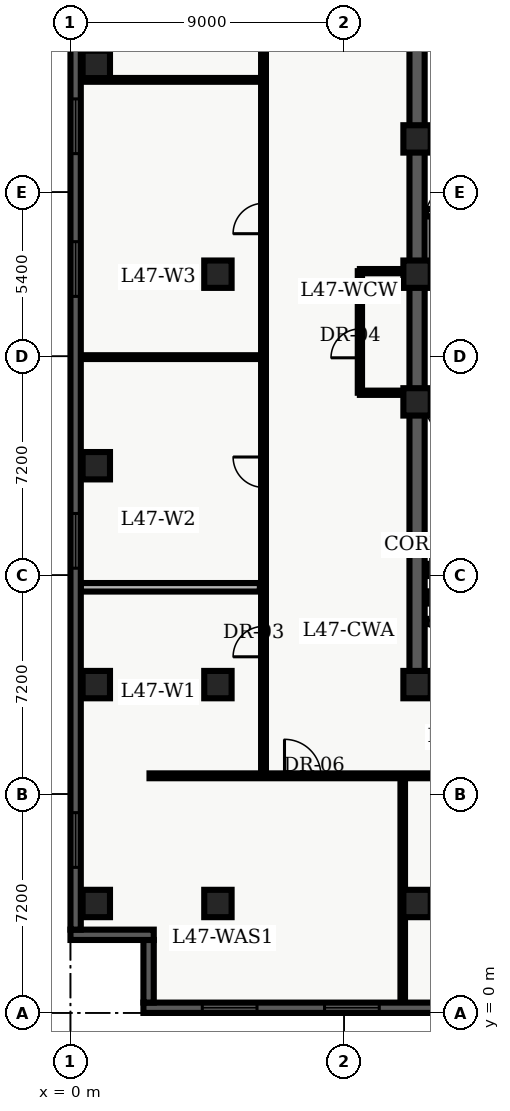
"""IFC4 building model, lengths in metres.
Left out: names, types, materials, properties, quantities, classifications, styles, units other than length and angle.
Written with IfcOpenShell. Run it as: python <this file> out.ifc"""

import sys

from ifc_helpers import new_model, entity, si_unit, converted_unit, direction, frame, origin_with_axes, origin_2d_with_axis, place, context, subcontext, project, spatial, polyline, rectangle, outline, extrude, element, fill, save


model = new_model("IFC4")
c1 = context("Model", 3, precision=1e-05, world=origin_with_axes(), true_north=direction((0.0, 1.0)))
c2 = subcontext(c1, "Body", "Model", "MODEL_VIEW")
j1 = project(units=[si_unit("LENGTHUNIT", "METRE"), converted_unit("PLANEANGLEUNIT", "DEGREE", entity("IfcPlaneAngleMeasure", 0.017), si_unit("PLANEANGLEUNIT", "RADIAN"), dimensions=[0, 0, 0, 0, 0, 0, 0])], contexts=[c1])
p1 = place(None, origin_with_axes())
s1 = spatial("IfcSite", under=j1, at=p1, CompositionType="ELEMENT")
p2 = place(p1, origin_with_axes())
s2 = spatial("IfcBuilding", under=s1, at=p2, CompositionType="ELEMENT")
p3 = place(p2, frame((0.0, 0.0, 192.6), z_axis=(0.0, 0.0, 1.0), x_axis=(1.0, 0.0, 0.0)))
s3 = spatial("IfcBuildingStorey", under=s2, at=p3, CompositionType="ELEMENT", Elevation=192.6)
p4 = place(p3, frame((11.4, 10.8, 0.0), z_axis=(0.0, 0.0, 1.0), x_axis=(0.0, 1.0, 0.0)))
e1 = element("IfcWall", 1, at=p4, inside=s3, PredefinedType="SHEAR", context=c2, shape_type="SweptSolid", body=[
    extrude(outline(polyline([(0.0, -0.25), (27.0, -0.25), (27.0, 0.25), (0.0, 0.25), (0.0, -0.25)])), origin_with_axes(), (0.0, 0.0, 1.0), 3.66),
])
p5 = place(p3, frame((11.4, 10.8, 0.0), z_axis=(0.0, 0.0, 1.0), x_axis=(1.0, 0.0, 0.0)))
e2 = element("IfcWall", 2, at=p5, inside=s3, PredefinedType="SHEAR", context=c2, shape_type="SweptSolid", body=[
    extrude(outline(polyline([(0.0, -0.25), (7.2, -0.25), (7.2, 0.25), (0.0, 0.25), (0.0, -0.25)])), origin_with_axes(), (0.0, 0.0, 1.0), 3.66),
])
p6 = place(p5, frame((2.625, 0.0, 0.0), z_axis=(0.0, 0.0, 1.0), x_axis=(1.0, 0.0, 0.0)))
e3 = element("IfcOpeningElement", 3, at=p6, cuts=e2, PredefinedType="OPENING", context=c2, shape_type="SweptSolid", body=[
    extrude(rectangle(XDim=1.05, YDim=0.52, at=origin_2d_with_axis()), origin_with_axes(), (0.0, 0.0, 1.0), 2.15),
])
for number, where, z_axis, x_axis in (
    (4, (11.65, 19.825, 0.0), (0.0, 0.0, 1.0), (1.0, 0.0, 0.0)),
    (5, (11.65, 28.775, 0.0), (0.0, 0.0, 1.0), (1.0, 0.0, 0.0)),
):
    element("IfcWall", number, at=place(p3, frame(where, z_axis=z_axis, x_axis=x_axis)), inside=s3, PredefinedType="SHEAR", context=c2, shape_type="SweptSolid", body=[
        extrude(outline(polyline([(0.0, -0.125), (6.7, -0.125), (6.7, 0.125), (0.0, 0.125), (0.0, -0.125)])), origin_with_axes(), (0.0, 0.0, 1.0), 3.66),
    ])
p7 = place(p3, frame((11.7, 24.1, 0.0), z_axis=(0.0, 0.0, 1.0), x_axis=(1.0, 0.0, 0.0)))
e6 = element("IfcWall", 6, at=p7, inside=s3, PredefinedType="SOLIDWALL", context=c2, shape_type="SweptSolid", body=[
    extrude(outline(polyline([(0.0, -0.125), (6.6, -0.125), (6.6, 0.125), (0.0, 0.125), (0.0, -0.125)])), origin_with_axes(), (0.0, 0.0, 1.0), 2.7),
])
p8 = place(p7, frame((3.75, 0.0, 0.0), z_axis=(0.0, 0.0, 1.0), x_axis=(1.0, 0.0, 0.0)))
e7 = element("IfcOpeningElement", 7, at=p8, cuts=e6, PredefinedType="OPENING", context=c2, shape_type="SweptSolid", body=[
    extrude(rectangle(XDim=0.9, YDim=0.27, at=origin_2d_with_axis()), origin_with_axes(), (0.0, 0.0, 1.0), 2.15),
])
p9 = place(p3, frame((11.7, 26.325, 0.0), z_axis=(0.0, 0.0, 1.0), x_axis=(1.0, 0.0, 0.0)))
e8 = element("IfcWall", 8, at=p9, inside=s3, PredefinedType="SOLIDWALL", context=c2, shape_type="SweptSolid", body=[
    extrude(outline(polyline([(0.0, -0.125), (6.6, -0.125), (6.6, 0.125), (0.0, 0.125), (0.0, -0.125)])), origin_with_axes(), (0.0, 0.0, 1.0), 2.7),
])
p10 = place(p9, frame((3.5, 0.0, 0.0), z_axis=(0.0, 0.0, 1.0), x_axis=(1.0, 0.0, 0.0)))
e9 = element("IfcOpeningElement", 9, at=p10, cuts=e8, PredefinedType="OPENING", context=c2, shape_type="SweptSolid", body=[
    extrude(rectangle(XDim=0.9, YDim=0.27, at=origin_2d_with_axis()), origin_with_axes(), (0.0, 0.0, 1.0), 2.15),
])
for number, where, z_axis, x_axis in (
    (10, (11.4, 3.6, 0.0), (0.0, 0.0, 1.0), (1.0, 0.0, 0.0)),
    (11, (11.4, 10.8, 0.0), (0.0, 0.0, 1.0), (1.0, 0.0, 0.0)),
    (12, (11.4, 20.1, 0.0), (0.0, 0.0, 1.0), (1.0, 0.0, 0.0)),
    (13, (11.4, 24.3, 0.0), (0.0, 0.0, 1.0), (1.0, 0.0, 0.0)),
    (14, (11.4, 28.75, 0.0), (0.0, 0.0, 1.0), (1.0, 0.0, 0.0)),
    (15, (4.85, 3.6, 0.0), (0.0, 0.0, 1.0), (1.0, 0.0, 0.0)),
    (16, (4.85, 10.8, 0.0), (0.0, 0.0, 1.0), (1.0, 0.0, 0.0)),
    (17, (4.85, 24.3, 0.0), (0.0, 0.0, 1.0), (1.0, 0.0, 0.0)),
    (18, (0.85, 3.6, 0.0), (0.0, 0.0, 1.0), (1.0, 0.0, 0.0)),
    (19, (0.85, 10.8, 0.0), (0.0, 0.0, 1.0), (1.0, 0.0, 0.0)),
    (20, (0.85, 18.0, 0.0), (0.0, 0.0, 1.0), (1.0, 0.0, 0.0)),
    (21, (0.85, 31.2, 0.0), (0.0, 0.0, 1.0), (1.0, 0.0, 0.0)),
):
    element("IfcColumn", number, at=place(p3, frame(where, z_axis=z_axis, x_axis=x_axis)), inside=s3, PredefinedType="COLUMN", context=c2, shape_type="SweptSolid", body=[
        extrude(rectangle(XDim=0.9, YDim=0.9, at=origin_2d_with_axis()), origin_with_axes(), (0.0, 0.0, 1.0), 3.9),
    ])
p11 = place(p3, frame((9.52, 20.4, 0.0), z_axis=(0.0, 0.0, 1.0), x_axis=(0.0, 1.0, 0.0)))
e22 = element("IfcWall", 22, at=p11, inside=s3, PredefinedType="PARTITIONING", context=c2, shape_type="SweptSolid", body=[
    extrude(outline(polyline([(0.0, -0.07), (4.0, -0.07), (4.0, 0.07), (0.0, 0.07), (0.0, -0.07)])), origin_with_axes(), (0.0, 0.0, 1.0), 2.7),
])
p12 = place(p11, frame((1.625, 0.0, 0.0), z_axis=(0.0, 0.0, 1.0), x_axis=(1.0, 0.0, 0.0)))
e23 = element("IfcOpeningElement", 23, at=p12, cuts=e22, PredefinedType="OPENING", context=c2, shape_type="SweptSolid", body=[
    extrude(rectangle(XDim=0.95, YDim=0.16, at=origin_2d_with_axis()), origin_with_axes(), (0.0, 0.0, 1.0), 2.15),
])
for number, where, z_axis, x_axis in (
    (24, (9.52, 20.4, 0.0), (0.0, 0.0, 1.0), (1.0, 0.0, 0.0)),
    (25, (9.52, 24.4, 0.0), (0.0, 0.0, 1.0), (1.0, 0.0, 0.0)),
):
    element("IfcWall", number, at=place(p3, frame(where, z_axis=z_axis, x_axis=x_axis)), inside=s3, PredefinedType="PARTITIONING", context=c2, shape_type="SweptSolid", body=[
        extrude(outline(polyline([(0.0, -0.07), (1.58, -0.07), (1.58, 0.07), (0.0, 0.07), (0.0, -0.07)])), origin_with_axes(), (0.0, 0.0, 1.0), 2.7),
    ])
p13 = place(p3, frame((2.6, 7.8, 0.0), z_axis=(0.0, 0.0, 1.0), x_axis=(1.0, 0.0, 0.0)))
e26 = element("IfcWall", 26, at=p13, inside=s3, PredefinedType="PARTITIONING", context=c2, shape_type="SweptSolid", body=[
    extrude(outline(polyline([(0.0, -0.08), (18.55, -0.08), (18.55, 0.08), (0.0, 0.08), (0.0, -0.08)])), origin_with_axes(), (0.0, 0.0, 1.0), 2.7),
])
p14 = place(p13, frame((5.04, 0.0, 0.0), z_axis=(0.0, 0.0, 1.0), x_axis=(1.0, 0.0, 0.0)))
e27 = element("IfcOpeningElement", 27, at=p14, cuts=e26, PredefinedType="OPENING", context=c2, shape_type="SweptSolid", body=[
    extrude(rectangle(XDim=1.2, YDim=0.18, at=origin_2d_with_axis()), origin_with_axes(), (0.0, 0.0, 1.0), 2.2),
])
p15 = place(p13, frame((13.415, 0.0, 0.0), z_axis=(0.0, 0.0, 1.0), x_axis=(1.0, 0.0, 0.0)))
e28 = element("IfcOpeningElement", 28, at=p15, cuts=e26, PredefinedType="OPENING", context=c2, shape_type="SweptSolid", body=[
    extrude(rectangle(XDim=1.0, YDim=0.18, at=origin_2d_with_axis()), origin_with_axes(), (0.0, 0.0, 1.0), 2.15),
])
p16 = place(p3, frame((6.35, 7.8, 0.0), z_axis=(0.0, 0.0, 1.0), x_axis=(0.0, 1.0, 0.0)))
e29 = element("IfcWall", 29, at=p16, inside=s3, PredefinedType="PARTITIONING", context=c2, shape_type="SweptSolid", body=[
    extrude(outline(polyline([(0.0, -0.08), (32.7, -0.08), (32.7, 0.08), (0.0, 0.08), (0.0, -0.08)])), origin_with_axes(), (0.0, 0.0, 1.0), 2.7),
])
p17 = place(p16, frame((4.415, 0.0, 0.0), z_axis=(0.0, 0.0, 1.0), x_axis=(1.0, 0.0, 0.0)))
e30 = element("IfcOpeningElement", 30, at=p17, cuts=e29, PredefinedType="OPENING", context=c2, shape_type="SweptSolid", body=[
    extrude(rectangle(XDim=1.0, YDim=0.18, at=origin_2d_with_axis()), origin_with_axes(), (0.0, 0.0, 1.0), 2.15),
])
p18 = place(p16, frame((9.986, 0.0, 0.0), z_axis=(0.0, 0.0, 1.0), x_axis=(1.0, 0.0, 0.0)))
e31 = element("IfcOpeningElement", 31, at=p18, cuts=e29, PredefinedType="OPENING", context=c2, shape_type="SweptSolid", body=[
    extrude(rectangle(XDim=1.0, YDim=0.18, at=origin_2d_with_axis()), origin_with_axes(), (0.0, 0.0, 1.0), 2.15),
])
p19 = place(p16, frame((18.332, 0.0, 0.0), z_axis=(0.0, 0.0, 1.0), x_axis=(1.0, 0.0, 0.0)))
e32 = element("IfcOpeningElement", 32, at=p19, cuts=e29, PredefinedType="OPENING", context=c2, shape_type="SweptSolid", body=[
    extrude(rectangle(XDim=1.0, YDim=0.18, at=origin_2d_with_axis()), origin_with_axes(), (0.0, 0.0, 1.0), 2.15),
])
p20 = place(p16, frame((25.088, 0.0, 0.0), z_axis=(0.0, 0.0, 1.0), x_axis=(1.0, 0.0, 0.0)))
e33 = element("IfcOpeningElement", 33, at=p20, cuts=e29, PredefinedType="OPENING", context=c2, shape_type="SweptSolid", body=[
    extrude(rectangle(XDim=1.0, YDim=0.18, at=origin_2d_with_axis()), origin_with_axes(), (0.0, 0.0, 1.0), 2.15),
])
p21 = place(p16, frame((31.177, 0.0, 0.0), z_axis=(0.0, 0.0, 1.0), x_axis=(1.0, 0.0, 0.0)))
e34 = element("IfcOpeningElement", 34, at=p21, cuts=e29, PredefinedType="OPENING", context=c2, shape_type="SweptSolid", body=[
    extrude(rectangle(XDim=1.0, YDim=0.18, at=origin_2d_with_axis()), origin_with_axes(), (0.0, 0.0, 1.0), 2.15),
])
p22 = place(p3, frame((0.335, 14.001, 0.0), z_axis=(0.0, 0.0, 1.0), x_axis=(1.0, 0.0, 0.0)))
e35 = element("IfcWall", 35, at=p22, inside=s3, PredefinedType="PARTITIONING", context=c2, shape_type="SweptSolid", body=[
    extrude(outline(polyline([(0.0, -0.14), (5.895, -0.14), (5.895, 0.14), (0.0, 0.14), (0.0, -0.14)])), origin_with_axes(), (0.0, 0.0, 1.0), 2.7),
])
for number, where, z_axis, x_axis in (
    (36, (0.335, 21.572, 0.0), (0.0, 0.0, 1.0), (1.0, 0.0, 0.0)),
    (37, (0.335, 30.692, 0.0), (0.0, 0.0, 1.0), (1.0, 0.0, 0.0)),
):
    element("IfcWall", number, at=place(p3, frame(where, z_axis=z_axis, x_axis=x_axis)), inside=s3, PredefinedType="PARTITIONING", context=c2, shape_type="SweptSolid", body=[
        extrude(outline(polyline([(0.0, -0.062), (5.895, -0.062), (5.895, 0.062), (0.0, 0.062), (0.0, -0.062)])), origin_with_axes(), (0.0, 0.0, 1.0), 2.7),
    ])
p23 = place(p3, frame((10.929, 0.335, 0.0), z_axis=(0.0, 0.0, 1.0), x_axis=(0.0, 1.0, 0.0)))
e38 = element("IfcWall", 38, at=p23, inside=s3, PredefinedType="PARTITIONING", context=c2, shape_type="SweptSolid", body=[
    extrude(outline(polyline([(0.0, -0.075), (7.365, -0.075), (7.365, 0.075), (0.0, 0.075), (0.0, -0.075)])), origin_with_axes(), (0.0, 0.0, 1.0), 2.7),
])
p24 = place(p3, frame((57.26, 0.17, 0.0), z_axis=(0.0, 0.0, 1.0), x_axis=(-1.0, 0.0, 0.0)))
e39 = element("IfcWall", 39, at=p24, inside=s3, PredefinedType="SOLIDWALL", context=c2, shape_type="SweptSolid", body=[
    extrude(outline(polyline([(0.0, -0.17), (54.86, -0.17), (54.86, 0.17), (0.0, 0.17), (0.0, -0.17)])), origin_with_axes(), (0.0, 0.0, 1.0), 3.66),
])
p25 = place(p24, frame((2.836, 0.0, 0.45), z_axis=(0.0, 0.0, 1.0), x_axis=(1.0, 0.0, 0.0)))
e40 = element("IfcOpeningElement", 40, at=p25, cuts=e39, PredefinedType="OPENING", context=c2, shape_type="SweptSolid", body=[
    extrude(rectangle(XDim=1.8, YDim=0.36, at=origin_2d_with_axis()), origin_with_axes(), (0.0, 0.0, 1.0), 2.1),
])
p26 = place(p24, frame((7.307, 0.0, 0.45), z_axis=(0.0, 0.0, 1.0), x_axis=(1.0, 0.0, 0.0)))
e41 = element("IfcOpeningElement", 41, at=p26, cuts=e39, PredefinedType="OPENING", context=c2, shape_type="SweptSolid", body=[
    extrude(rectangle(XDim=1.8, YDim=0.36, at=origin_2d_with_axis()), origin_with_axes(), (0.0, 0.0, 1.0), 2.1),
])
p27 = place(p24, frame((11.779, 0.0, 0.45), z_axis=(0.0, 0.0, 1.0), x_axis=(1.0, 0.0, 0.0)))
e42 = element("IfcOpeningElement", 42, at=p27, cuts=e39, PredefinedType="OPENING", context=c2, shape_type="SweptSolid", body=[
    extrude(rectangle(XDim=1.8, YDim=0.36, at=origin_2d_with_axis()), origin_with_axes(), (0.0, 0.0, 1.0), 2.1),
])
p28 = place(p24, frame((16.251, 0.0, 0.45), z_axis=(0.0, 0.0, 1.0), x_axis=(1.0, 0.0, 0.0)))
e43 = element("IfcOpeningElement", 43, at=p28, cuts=e39, PredefinedType="OPENING", context=c2, shape_type="SweptSolid", body=[
    extrude(rectangle(XDim=1.8, YDim=0.36, at=origin_2d_with_axis()), origin_with_axes(), (0.0, 0.0, 1.0), 2.1),
])
p29 = place(p24, frame((20.723, 0.0, 0.45), z_axis=(0.0, 0.0, 1.0), x_axis=(1.0, 0.0, 0.0)))
e44 = element("IfcOpeningElement", 44, at=p29, cuts=e39, PredefinedType="OPENING", context=c2, shape_type="SweptSolid", body=[
    extrude(rectangle(XDim=1.8, YDim=0.36, at=origin_2d_with_axis()), origin_with_axes(), (0.0, 0.0, 1.0), 2.1),
])
p30 = place(p24, frame((34.588, 0.0, 0.45), z_axis=(0.0, 0.0, 1.0), x_axis=(1.0, 0.0, 0.0)))
e45 = element("IfcOpeningElement", 45, at=p30, cuts=e39, PredefinedType="OPENING", context=c2, shape_type="SweptSolid", body=[
    extrude(rectangle(XDim=1.8, YDim=0.36, at=origin_2d_with_axis()), origin_with_axes(), (0.0, 0.0, 1.0), 2.1),
])
p31 = place(p24, frame((38.609, 0.0, 0.45), z_axis=(0.0, 0.0, 1.0), x_axis=(1.0, 0.0, 0.0)))
e46 = element("IfcOpeningElement", 46, at=p31, cuts=e39, PredefinedType="OPENING", context=c2, shape_type="SweptSolid", body=[
    extrude(rectangle(XDim=1.8, YDim=0.36, at=origin_2d_with_axis()), origin_with_axes(), (0.0, 0.0, 1.0), 2.1),
])
p32 = place(p24, frame((43.081, 0.0, 0.45), z_axis=(0.0, 0.0, 1.0), x_axis=(1.0, 0.0, 0.0)))
e47 = element("IfcOpeningElement", 47, at=p32, cuts=e39, PredefinedType="OPENING", context=c2, shape_type="SweptSolid", body=[
    extrude(rectangle(XDim=1.8, YDim=0.36, at=origin_2d_with_axis()), origin_with_axes(), (0.0, 0.0, 1.0), 2.1),
])
p33 = place(p24, frame((48.003, 0.0, 0.45), z_axis=(0.0, 0.0, 1.0), x_axis=(1.0, 0.0, 0.0)))
e48 = element("IfcOpeningElement", 48, at=p33, cuts=e39, PredefinedType="OPENING", context=c2, shape_type="SweptSolid", body=[
    extrude(rectangle(XDim=1.8, YDim=0.36, at=origin_2d_with_axis()), origin_with_axes(), (0.0, 0.0, 1.0), 2.1),
])
p34 = place(p24, frame((52.024, 0.0, 0.45), z_axis=(0.0, 0.0, 1.0), x_axis=(1.0, 0.0, 0.0)))
e49 = element("IfcOpeningElement", 49, at=p34, cuts=e39, PredefinedType="OPENING", context=c2, shape_type="SweptSolid", body=[
    extrude(rectangle(XDim=1.8, YDim=0.36, at=origin_2d_with_axis()), origin_with_axes(), (0.0, 0.0, 1.0), 2.1),
])
p35 = place(p3, frame((2.57, 0.34, 0.0), z_axis=(0.0, 0.0, 1.0), x_axis=(0.0, 1.0, 0.0)))
e50 = element("IfcWall", 50, at=p35, inside=s3, PredefinedType="SOLIDWALL", context=c2, shape_type="SweptSolid", body=[
    extrude(outline(polyline([(0.0, -0.17), (2.06, -0.17), (2.06, 0.17), (0.0, 0.17), (0.0, -0.17)])), origin_with_axes(), (0.0, 0.0, 1.0), 3.66),
])
p36 = place(p3, frame((2.74, 2.57, 0.0), z_axis=(0.0, 0.0, 1.0), x_axis=(-1.0, 0.0, 0.0)))
e51 = element("IfcWall", 51, at=p36, inside=s3, PredefinedType="SOLIDWALL", context=c2, shape_type="SweptSolid", body=[
    extrude(outline(polyline([(0.0, -0.17), (2.74, -0.17), (2.74, 0.17), (0.0, 0.17), (0.0, -0.17)])), origin_with_axes(), (0.0, 0.0, 1.0), 3.66),
])
p37 = place(p3, frame((0.17, 2.74, 0.0), z_axis=(0.0, 0.0, 1.0), x_axis=(0.0, 1.0, 0.0)))
e52 = element("IfcWall", 52, at=p37, inside=s3, PredefinedType="SOLIDWALL", context=c2, shape_type="SweptSolid", body=[
    extrude(outline(polyline([(0.0, -0.17), (43.46, -0.17), (43.46, 0.17), (0.0, 0.17), (0.0, -0.17)])), origin_with_axes(), (0.0, 0.0, 1.0), 3.66),
])
p38 = place(p37, frame((2.948, 0.0, 0.45), z_axis=(0.0, 0.0, 1.0), x_axis=(1.0, 0.0, 0.0)))
e53 = element("IfcOpeningElement", 53, at=p38, cuts=e52, PredefinedType="OPENING", context=c2, shape_type="SweptSolid", body=[
    extrude(rectangle(XDim=1.8, YDim=0.36, at=origin_2d_with_axis()), origin_with_axes(), (0.0, 0.0, 1.0), 2.1),
])
p39 = place(p37, frame((12.789, 0.0, 0.45), z_axis=(0.0, 0.0, 1.0), x_axis=(1.0, 0.0, 0.0)))
e54 = element("IfcOpeningElement", 54, at=p39, cuts=e52, PredefinedType="OPENING", context=c2, shape_type="SweptSolid", body=[
    extrude(rectangle(XDim=1.8, YDim=0.36, at=origin_2d_with_axis()), origin_with_axes(), (0.0, 0.0, 1.0), 2.1),
])
p40 = place(p37, frame((21.73, 0.0, 0.45), z_axis=(0.0, 0.0, 1.0), x_axis=(1.0, 0.0, 0.0)))
e55 = element("IfcOpeningElement", 55, at=p40, cuts=e52, PredefinedType="OPENING", context=c2, shape_type="SweptSolid", body=[
    extrude(rectangle(XDim=1.8, YDim=0.36, at=origin_2d_with_axis()), origin_with_axes(), (0.0, 0.0, 1.0), 2.1),
])
p41 = place(p37, frame((26.426, 0.0, 0.45), z_axis=(0.0, 0.0, 1.0), x_axis=(1.0, 0.0, 0.0)))
e56 = element("IfcOpeningElement", 56, at=p41, cuts=e52, PredefinedType="OPENING", context=c2, shape_type="SweptSolid", body=[
    extrude(rectangle(XDim=1.8, YDim=0.36, at=origin_2d_with_axis()), origin_with_axes(), (0.0, 0.0, 1.0), 2.1),
])
p42 = place(p37, frame((30.671, 0.0, 0.45), z_axis=(0.0, 0.0, 1.0), x_axis=(1.0, 0.0, 0.0)))
e57 = element("IfcOpeningElement", 57, at=p42, cuts=e52, PredefinedType="OPENING", context=c2, shape_type="SweptSolid", body=[
    extrude(rectangle(XDim=1.8, YDim=0.36, at=origin_2d_with_axis()), origin_with_axes(), (0.0, 0.0, 1.0), 2.1),
])
p43 = place(p37, frame((40.062, 0.0, 0.45), z_axis=(0.0, 0.0, 1.0), x_axis=(1.0, 0.0, 0.0)))
e58 = element("IfcOpeningElement", 58, at=p43, cuts=e52, PredefinedType="OPENING", context=c2, shape_type="SweptSolid", body=[
    extrude(rectangle(XDim=1.8, YDim=0.36, at=origin_2d_with_axis()), origin_with_axes(), (0.0, 0.0, 1.0), 2.1),
])
p44 = place(p11, frame((1.625, 0.0, 0.0), z_axis=(0.0, 0.0, 1.0), x_axis=(1.0, 0.0, 0.0)))
e59 = element("IfcDoor", 59, at=p44, inside=s3, OperationType="SINGLE_SWING_LEFT", PredefinedType="DOOR", context=c2, shape_type="SweptSolid", body=[
    extrude(rectangle(XDim=0.95, YDim=0.084, at=origin_2d_with_axis()), origin_with_axes(), (0.0, 0.0, 1.0), 2.15),
])
fill(e23, e59)
p45 = place(p16, frame((4.415, 0.0, 0.0), z_axis=(0.0, 0.0, 1.0), x_axis=(1.0, 0.0, 0.0)))
e60 = element("IfcDoor", 60, at=p45, inside=s3, OperationType="SINGLE_SWING_LEFT", PredefinedType="DOOR", context=c2, shape_type="SweptSolid", body=[
    extrude(rectangle(XDim=1.0, YDim=0.09, at=origin_2d_with_axis()), origin_with_axes(), (0.0, 0.0, 1.0), 2.15),
])
fill(e30, e60)
p46 = place(p16, frame((9.986, 0.0, 0.0), z_axis=(0.0, 0.0, 1.0), x_axis=(1.0, 0.0, 0.0)))
e61 = element("IfcDoor", 61, at=p46, inside=s3, OperationType="SINGLE_SWING_RIGHT", PredefinedType="DOOR", context=c2, shape_type="SweptSolid", body=[
    extrude(rectangle(XDim=1.0, YDim=0.09, at=origin_2d_with_axis()), origin_with_axes(), (0.0, 0.0, 1.0), 2.15),
])
fill(e31, e61)
p47 = place(p16, frame((18.332, 0.0, 0.0), z_axis=(0.0, 0.0, 1.0), x_axis=(1.0, 0.0, 0.0)))
e62 = element("IfcDoor", 62, at=p47, inside=s3, OperationType="SINGLE_SWING_LEFT", PredefinedType="DOOR", context=c2, shape_type="SweptSolid", body=[
    extrude(rectangle(XDim=1.0, YDim=0.09, at=origin_2d_with_axis()), origin_with_axes(), (0.0, 0.0, 1.0), 2.15),
])
fill(e32, e62)
p48 = place(p13, frame((5.04, 0.0, 0.0), z_axis=(0.0, 0.0, 1.0), x_axis=(1.0, 0.0, 0.0)))
e63 = element("IfcDoor", 63, at=p48, inside=s3, OperationType="SINGLE_SWING_LEFT", PredefinedType="DOOR", context=c2, shape_type="SweptSolid", body=[
    extrude(rectangle(XDim=1.2, YDim=0.09, at=origin_2d_with_axis()), origin_with_axes(), (0.0, 0.0, 1.0), 2.2),
])
fill(e27, e63)
p49 = place(p24, frame((48.003, 0.0, 0.45), z_axis=(0.0, 0.0, 1.0), x_axis=(1.0, 0.0, 0.0)))
e64 = element("IfcWindow", 64, at=p49, inside=s3, PredefinedType="WINDOW", context=c2, shape_type="SweptSolid", body=[
    extrude(rectangle(XDim=1.8, YDim=0.09, at=origin_2d_with_axis()), origin_with_axes(), (0.0, 0.0, 1.0), 2.1),
])
fill(e48, e64)
p50 = place(p24, frame((52.024, 0.0, 0.45), z_axis=(0.0, 0.0, 1.0), x_axis=(1.0, 0.0, 0.0)))
e65 = element("IfcWindow", 65, at=p50, inside=s3, PredefinedType="WINDOW", context=c2, shape_type="SweptSolid", body=[
    extrude(rectangle(XDim=1.8, YDim=0.09, at=origin_2d_with_axis()), origin_with_axes(), (0.0, 0.0, 1.0), 2.1),
])
fill(e49, e65)
p51 = place(p37, frame((2.948, 0.0, 0.45), z_axis=(0.0, 0.0, 1.0), x_axis=(1.0, 0.0, 0.0)))
e66 = element("IfcWindow", 66, at=p51, inside=s3, PredefinedType="WINDOW", context=c2, shape_type="SweptSolid", body=[
    extrude(rectangle(XDim=1.8, YDim=0.09, at=origin_2d_with_axis()), origin_with_axes(), (0.0, 0.0, 1.0), 2.1),
])
fill(e53, e66)
p52 = place(p37, frame((12.789, 0.0, 0.45), z_axis=(0.0, 0.0, 1.0), x_axis=(1.0, 0.0, 0.0)))
e67 = element("IfcWindow", 67, at=p52, inside=s3, PredefinedType="WINDOW", context=c2, shape_type="SweptSolid", body=[
    extrude(rectangle(XDim=1.8, YDim=0.09, at=origin_2d_with_axis()), origin_with_axes(), (0.0, 0.0, 1.0), 2.1),
])
fill(e54, e67)
p53 = place(p37, frame((21.73, 0.0, 0.45), z_axis=(0.0, 0.0, 1.0), x_axis=(1.0, 0.0, 0.0)))
e68 = element("IfcWindow", 68, at=p53, inside=s3, PredefinedType="WINDOW", context=c2, shape_type="SweptSolid", body=[
    extrude(rectangle(XDim=1.8, YDim=0.09, at=origin_2d_with_axis()), origin_with_axes(), (0.0, 0.0, 1.0), 2.1),
])
fill(e55, e68)
p54 = place(p37, frame((26.426, 0.0, 0.45), z_axis=(0.0, 0.0, 1.0), x_axis=(1.0, 0.0, 0.0)))
e69 = element("IfcWindow", 69, at=p54, inside=s3, PredefinedType="WINDOW", context=c2, shape_type="SweptSolid", body=[
    extrude(rectangle(XDim=1.8, YDim=0.09, at=origin_2d_with_axis()), origin_with_axes(), (0.0, 0.0, 1.0), 2.1),
])
fill(e56, e69)
save(model, sys.argv[1])
